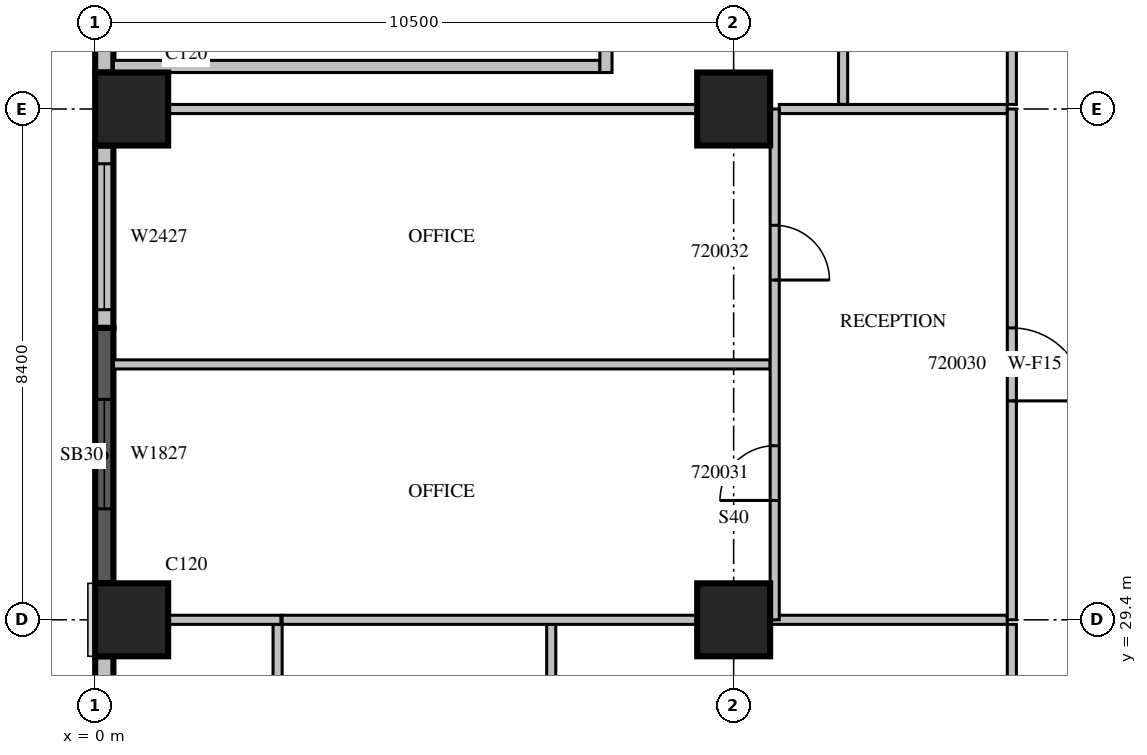
"""IFC4 building model, lengths in metres.
Left out: names, types, materials, properties, quantities, classifications, styles, units other than length and angle.
Written with IfcOpenShell. Run it as: python <this file> out.ifc"""

import sys

from ifc_helpers import new_model, si_unit, direction, frame, frame_2d, origin, origin_2d, place, context, subcontext, project, spatial, rectangle, extrude, source, transform, mapped, element, fill, save


model = new_model("IFC4")
c1 = context("Model", 3, precision=1e-05, world=origin(), true_north=direction((0.0, 1.0)))
c2 = subcontext(c1, "Body", "Model", "MODEL_VIEW")
j1 = project(units=[si_unit("LENGTHUNIT", "METRE"), si_unit("PLANEANGLEUNIT", "RADIAN")], contexts=[c1])
p1 = place(None, origin())
s1 = spatial("IfcSite", under=j1, at=p1, CompositionType="ELEMENT")
p2 = place(p1, origin())
s2 = spatial("IfcBuilding", under=s1, at=p2, CompositionType="ELEMENT")
p3 = place(p2, frame((0.0, 0.0, 95.1)))
s3 = spatial("IfcBuildingStorey", under=s2, at=p3, CompositionType="ELEMENT", Elevation=95.1)
m1 = source(origin(), c2, "Body", "SweptSolid", [
    extrude(rectangle(XDim=1.2, YDim=1.2, at=origin_2d()), origin(), (0.0, 0.0, 1.0), 4.2),
])
for number, where, z_axis, x_axis in (
    (1, (0.6, 29.4, 0.0), (0.0, 0.0, 1.0), (1.0, 0.0, 0.0)),
    (2, (10.5, 29.4, 0.0), (0.0, 0.0, 1.0), (1.0, 0.0, 0.0)),
    (3, (0.6, 37.8, 0.0), (0.0, 0.0, 1.0), (1.0, 0.0, 0.0)),
    (4, (10.5, 37.8, 0.0), (0.0, 0.0, 1.0), (1.0, 0.0, 0.0)),
):
    element("IfcColumn", number, at=place(p3, frame(where, z_axis=z_axis, x_axis=x_axis)), inside=s3, PredefinedType="COLUMN", context=c2, shape_type="MappedRepresentation", body=[
        mapped(m1, transform((0.0, 0.0, 0.0), scale=1.0)),
    ])
m2 = source(origin(), c2, "Body", "SweptSolid", [
    extrude(rectangle(XDim=1.8, YDim=0.3, at=frame_2d((0.9, 0.0))), origin(), (0.0, 0.0, 1.0), 3.8),
])
p4 = place(p3, frame((0.15, 40.2, 0.0), z_axis=(0.0, 0.0, 1.0), x_axis=(0.0, -1.0, 0.0)))
e5 = element("IfcWall", 5, at=p4, inside=s3, PredefinedType="STANDARD", context=c2, shape_type="MappedRepresentation", body=[
    mapped(m2, transform((0.0, 0.0, 0.0), scale=1.0)),
])
m3 = source(origin(), c2, "Body", "SweptSolid", [
    extrude(rectangle(XDim=3.0, YDim=0.3, at=frame_2d((1.5, 0.0))), origin(), (0.0, 0.0, 1.0), 3.8),
])
p5 = place(p3, frame((0.15, 37.2, 0.0), z_axis=(0.0, 0.0, 1.0), x_axis=(0.0, -1.0, 0.0)))
e6 = element("IfcWall", 6, at=p5, inside=s3, PredefinedType="STANDARD", context=c2, shape_type="MappedRepresentation", body=[
    mapped(m3, transform((0.0, 0.0, 0.0), scale=1.0)),
])
m4 = source(origin(), c2, "Body", "SweptSolid", [
    extrude(rectangle(XDim=2.4, YDim=2.7, at=frame_2d((1.2, 1.35))), frame((0.0, 0.16, 0.0), z_axis=(0.0, -1.0, 0.0), x_axis=(1.0, 0.0, 0.0)), (0.0, 0.0, 1.0), 0.32),
])
p6 = place(p5, frame((0.3, 0.0, 0.6)))
e7 = element("IfcOpeningElement", 7, at=p6, cuts=e6, PredefinedType="OPENING", context=c2, shape_type="MappedRepresentation", body=[
    mapped(m4, transform((0.0, 0.0, 0.0), scale=1.0)),
])
m5 = source(origin(), c2, "Body", "SweptSolid", [
    extrude(rectangle(XDim=4.2, YDim=0.3, at=frame_2d((2.1, 0.0))), origin(), (0.0, 0.0, 1.0), 3.8),
])
p7 = place(p3, frame((0.15, 34.2, 0.0), z_axis=(0.0, 0.0, 1.0), x_axis=(0.0, -1.0, 0.0)))
e8 = element("IfcWall", 8, at=p7, inside=s3, PredefinedType="SOLIDWALL", context=c2, shape_type="MappedRepresentation", body=[
    mapped(m5, transform((0.0, 0.0, 0.0), scale=1.0)),
])
m6 = source(origin(), c2, "Body", "SweptSolid", [
    extrude(rectangle(XDim=1.8, YDim=2.7, at=frame_2d((0.9, 1.35))), frame((0.0, 0.16, 0.0), z_axis=(0.0, -1.0, 0.0), x_axis=(1.0, 0.0, 0.0)), (0.0, 0.0, 1.0), 0.32),
])
p8 = place(p7, frame((1.175, 0.0, 0.6)))
e9 = element("IfcOpeningElement", 9, at=p8, cuts=e8, PredefinedType="OPENING", context=c2, shape_type="MappedRepresentation", body=[
    mapped(m6, transform((0.0, 0.0, 0.0), scale=1.0)),
])
m7 = source(origin(), c2, "Body", "SweptSolid", [
    extrude(rectangle(XDim=7.2, YDim=0.3, at=frame_2d((3.6, 0.0))), origin(), (0.0, 0.0, 1.0), 3.8),
])
p9 = place(p3, frame((0.15, 28.8, 0.0), z_axis=(0.0, 0.0, 1.0), x_axis=(0.0, -1.0, 0.0)))
e10 = element("IfcWall", 10, at=p9, inside=s3, PredefinedType="STANDARD", context=c2, shape_type="MappedRepresentation", body=[
    mapped(m7, transform((0.0, 0.0, 0.0), scale=1.0)),
])
m8 = source(origin(), c2, "Body", "SweptSolid", [
    extrude(rectangle(XDim=3.0, YDim=2.7, at=frame_2d((1.5, 1.35))), frame((0.0, 0.16, 0.0), z_axis=(0.0, -1.0, 0.0), x_axis=(1.0, 0.0, 0.0)), (0.0, 0.0, 1.0), 0.32),
])
p10 = place(p9, frame((0.84, 0.0, 0.6)))
e11 = element("IfcOpeningElement", 11, at=p10, cuts=e10, PredefinedType="OPENING", context=c2, shape_type="MappedRepresentation", body=[
    mapped(m8, transform((0.0, 0.0, 0.0), scale=1.0)),
])
p11 = place(p9, frame((4.32, 0.0, 0.6)))
e12 = element("IfcOpeningElement", 12, at=p11, cuts=e10, PredefinedType="OPENING", context=c2, shape_type="MappedRepresentation", body=[
    mapped(m4, transform((0.0, 0.0, 0.0), scale=1.0)),
])
m9 = source(origin(), c2, "Body", "SweptSolid", [
    extrude(rectangle(XDim=8.0, YDim=0.2, at=frame_2d((4.0, 0.0))), origin(), (0.0, 0.0, 1.0), 3.8),
])
p12 = place(p3, frame((0.3, 38.5, 0.0), z_axis=(0.0, 0.0, 1.0), x_axis=(1.0, 0.0, 0.0)))
e13 = element("IfcWall", 13, at=p12, inside=s3, PredefinedType="PARTITIONING", context=c2, shape_type="MappedRepresentation", body=[
    mapped(m9, transform((0.0, 0.0, 0.0), scale=1.0)),
])
m10 = source(origin(), c2, "Body", "SweptSolid", [
    extrude(rectangle(XDim=5.45, YDim=0.2, at=frame_2d((2.725, 0.0))), origin(), (0.0, 0.0, 1.0), 3.8),
])
p13 = place(p3, frame((8.4, 38.4, 0.0), z_axis=(0.0, 0.0, 1.0), x_axis=(0.0, 1.0, 0.0)))
e14 = element("IfcWall", 14, at=p13, inside=s3, PredefinedType="PARTITIONING", context=c2, shape_type="MappedRepresentation", body=[
    mapped(m10, transform((0.0, 0.0, 0.0), scale=1.0)),
])
m11 = source(origin(), c2, "Body", "SweptSolid", [
    extrude(rectangle(XDim=1.2, YDim=2.1, at=frame_2d((0.6, 1.05))), frame((0.0, 0.11, 0.0), z_axis=(0.0, -1.0, 0.0), x_axis=(1.0, 0.0, 0.0)), (0.0, 0.0, 1.0), 0.22),
])
p14 = place(p13, frame((0.4, 0.0, 0.0)))
e15 = element("IfcOpeningElement", 15, at=p14, cuts=e14, PredefinedType="OPENING", context=c2, shape_type="MappedRepresentation", body=[
    mapped(m11, transform((0.0, 0.0, 0.0), scale=1.0)),
])
m12 = source(origin(), c2, "Body", "SweptSolid", [
    extrude(rectangle(XDim=0.9, YDim=2.1, at=frame_2d((0.45, 1.05))), frame((0.0, 0.11, 0.0), z_axis=(0.0, -1.0, 0.0), x_axis=(1.0, 0.0, 0.0)), (0.0, 0.0, 1.0), 0.22),
])
p15 = place(p13, frame((3.25, 0.0, 0.0)))
e16 = element("IfcOpeningElement", 16, at=p15, cuts=e14, PredefinedType="OPENING", context=c2, shape_type="MappedRepresentation", body=[
    mapped(m12, transform((0.0, 0.0, 0.0), scale=1.0)),
])
m13 = source(origin(), c2, "Body", "SweptSolid", [
    extrude(rectangle(XDim=3.65, YDim=0.15, at=frame_2d((1.825, 0.0))), origin(), (0.0, 0.0, 1.0), 3.8),
])
for number, where, z_axis, x_axis in (
    (17, (7.5, 25.675, 0.0), (0.0, 0.0, 1.0), (0.0, 1.0, 0.0)),
    (18, (15.075, 25.675, 0.0), (0.0, 0.0, 1.0), (0.0, 1.0, 0.0)),
):
    element("IfcWall", number, at=place(p3, frame(where, z_axis=z_axis, x_axis=x_axis)), inside=s3, PredefinedType="PARTITIONING", context=c2, shape_type="MappedRepresentation", body=[
        mapped(m13, transform((0.0, 0.0, 0.0), scale=1.0)),
    ])
m14 = source(origin(), c2, "Body", "SweptSolid", [
    extrude(rectangle(XDim=6.826, YDim=0.15, at=frame_2d((3.413, 0.0))), origin(), (0.0, 0.0, 1.0), 3.8),
])
p16 = place(p3, frame((9.901, 29.4, 0.0), z_axis=(0.0, 0.0, 1.0), x_axis=(-1.0, 0.0, 0.0)))
e19 = element("IfcWall", 19, at=p16, inside=s3, PredefinedType="PARTITIONING", context=c2, shape_type="MappedRepresentation", body=[
    mapped(m14, transform((0.0, 0.0, 0.0), scale=1.0)),
])
m15 = source(origin(), c2, "Body", "SweptSolid", [
    extrude(rectangle(XDim=3.901, YDim=0.15, at=frame_2d((1.95, 0.0))), origin(), (0.0, 0.0, 1.0), 3.8),
])
p17 = place(p3, frame((15.0, 29.4, 0.0), z_axis=(0.0, 0.0, 1.0), x_axis=(-1.0, 0.0, 0.0)))
e20 = element("IfcWall", 20, at=p17, inside=s3, PredefinedType="PARTITIONING", context=c2, shape_type="MappedRepresentation", body=[
    mapped(m15, transform((0.0, 0.0, 0.0), scale=1.0)),
])
m16 = source(origin(), c2, "Body", "SweptSolid", [
    extrude(rectangle(XDim=7.125, YDim=0.15, at=frame_2d((3.562, 0.0))), origin(), (0.0, 0.0, 1.0), 3.8),
])
p18 = place(p3, frame((3.0, 29.325, 0.0), z_axis=(0.0, 0.0, 1.0), x_axis=(0.0, -1.0, 0.0)))
e21 = element("IfcWall", 21, at=p18, inside=s3, PredefinedType="PARTITIONING", context=c2, shape_type="MappedRepresentation", body=[
    mapped(m16, transform((0.0, 0.0, 0.0), scale=1.0)),
])
m17 = source(origin(), c2, "Body", "SweptSolid", [
    extrude(rectangle(XDim=2.2, YDim=2.1, at=frame_2d((1.1, 1.05))), frame((0.0, 0.085, 0.0), z_axis=(0.0, -1.0, 0.0), x_axis=(1.0, 0.0, 0.0)), (0.0, 0.0, 1.0), 0.17),
])
p19 = place(p18, frame((4.325, 0.0, 0.0)))
e22 = element("IfcOpeningElement", 22, at=p19, cuts=e21, PredefinedType="OPENING", context=c2, shape_type="MappedRepresentation", body=[
    mapped(m17, transform((0.0, 0.0, 0.0), scale=1.0)),
])
m18 = source(origin(), c2, "Body", "SweptSolid", [
    extrude(rectangle(XDim=6.45, YDim=0.15, at=frame_2d((3.225, 0.0))), origin(), (0.0, 0.0, 1.0), 3.8),
])
p20 = place(p3, frame((12.3, 44.325, 0.0), z_axis=(0.0, 0.0, 1.0), x_axis=(0.0, -1.0, 0.0)))
e23 = element("IfcWall", 23, at=p20, inside=s3, PredefinedType="PARTITIONING", context=c2, shape_type="MappedRepresentation", body=[
    mapped(m18, transform((0.0, 0.0, 0.0), scale=1.0)),
])
p21 = place(p3, frame((15.075, 37.875, 0.0), z_axis=(0.0, 0.0, 1.0), x_axis=(0.0, 1.0, 0.0)))
e24 = element("IfcWall", 24, at=p21, inside=s3, PredefinedType="PARTITIONING", context=c2, shape_type="MappedRepresentation", body=[
    mapped(m18, transform((0.0, 0.0, 0.0), scale=1.0)),
])
m19 = source(origin(), c2, "Body", "SweptSolid", [
    extrude(rectangle(XDim=0.9, YDim=2.1, at=frame_2d((0.45, 1.05))), frame((0.0, 0.085, 0.0), z_axis=(0.0, -1.0, 0.0), x_axis=(1.0, 0.0, 0.0)), (0.0, 0.0, 1.0), 0.17),
])
p22 = place(p21, frame((2.737, 0.0, 0.0)))
e25 = element("IfcOpeningElement", 25, at=p22, cuts=e24, PredefinedType="OPENING", context=c2, shape_type="MappedRepresentation", body=[
    mapped(m19, transform((0.0, 0.0, 0.0), scale=1.0)),
])
m20 = source(origin(), c2, "Body", "SweptSolid", [
    extrude(rectangle(XDim=10.8, YDim=0.15, at=frame_2d((5.4, 0.0))), origin(), (0.0, 0.0, 1.0), 3.8),
])
p23 = place(p3, frame((11.1, 33.6, 0.0), z_axis=(0.0, 0.0, 1.0), x_axis=(-1.0, 0.0, 0.0)))
e26 = element("IfcWall", 26, at=p23, inside=s3, PredefinedType="PARTITIONING", context=c2, shape_type="MappedRepresentation", body=[
    mapped(m20, transform((0.0, 0.0, 0.0), scale=1.0)),
])
m21 = source(origin(), c2, "Body", "SweptSolid", [
    extrude(rectangle(XDim=1.856, YDim=0.15, at=frame_2d((0.928, 0.0))), origin(), (0.0, 0.0, 1.0), 3.8),
])
p24 = place(p3, frame((3.055, 29.4, 0.0), z_axis=(0.0, 0.0, 1.0), x_axis=(-1.0, 0.0, 0.0)))
e27 = element("IfcWall", 27, at=p24, inside=s3, PredefinedType="PARTITIONING", context=c2, shape_type="MappedRepresentation", body=[
    mapped(m21, transform((0.0, 0.0, 0.0), scale=1.0)),
])
m22 = source(origin(), c2, "Body", "SweptSolid", [
    extrude(rectangle(XDim=8.702, YDim=0.15, at=frame_2d((4.351, 0.0))), origin(), (0.0, 0.0, 1.0), 3.8),
])
p25 = place(p3, frame((9.901, 37.8, 0.0), z_axis=(0.0, 0.0, 1.0), x_axis=(-1.0, 0.0, 0.0)))
e28 = element("IfcWall", 28, at=p25, inside=s3, PredefinedType="PARTITIONING", context=c2, shape_type="MappedRepresentation", body=[
    mapped(m22, transform((0.0, 0.0, 0.0), scale=1.0)),
])
m23 = source(origin(), c2, "Body", "SweptSolid", [
    extrude(rectangle(XDim=3.75, YDim=0.15, at=frame_2d((1.875, 0.0))), origin(), (0.0, 0.0, 1.0), 3.8),
])
p26 = place(p3, frame((15.0, 37.8, 0.0), z_axis=(0.0, 0.0, 1.0), x_axis=(-1.0, 0.0, 0.0)))
e29 = element("IfcWall", 29, at=p26, inside=s3, PredefinedType="PARTITIONING", context=c2, shape_type="MappedRepresentation", body=[
    mapped(m23, transform((0.0, 0.0, 0.0), scale=1.0)),
])
m24 = source(origin(), c2, "Body", "SweptSolid", [
    extrude(rectangle(XDim=8.4, YDim=0.15, at=frame_2d((4.2, 0.0))), origin(), (0.0, 0.0, 1.0), 3.8),
])
p27 = place(p3, frame((11.175, 29.4, 0.0), z_axis=(0.0, 0.0, 1.0), x_axis=(0.0, 1.0, 0.0)))
e30 = element("IfcWall", 30, at=p27, inside=s3, PredefinedType="PARTITIONING", context=c2, shape_type="MappedRepresentation", body=[
    mapped(m24, transform((0.0, 0.0, 0.0), scale=1.0)),
])
p28 = place(p27, frame((1.962, 0.0, 0.0)))
e31 = element("IfcOpeningElement", 31, at=p28, cuts=e30, PredefinedType="OPENING", context=c2, shape_type="MappedRepresentation", body=[
    mapped(m19, transform((0.0, 0.0, 0.0), scale=1.0)),
])
p29 = place(p27, frame((5.588, 0.0, 0.0)))
e32 = element("IfcOpeningElement", 32, at=p29, cuts=e30, PredefinedType="OPENING", context=c2, shape_type="MappedRepresentation", body=[
    mapped(m19, transform((0.0, 0.0, 0.0), scale=1.0)),
])
p30 = place(p3, frame((15.075, 29.4, 0.0), z_axis=(0.0, 0.0, 1.0), x_axis=(0.0, 1.0, 0.0)))
e33 = element("IfcWall", 33, at=p30, inside=s3, PredefinedType="PARTITIONING", context=c2, shape_type="MappedRepresentation", body=[
    mapped(m24, transform((0.0, 0.0, 0.0), scale=1.0)),
])
m25 = source(origin(), c2, "Body", "SweptSolid", [
    extrude(rectangle(XDim=1.2, YDim=2.1, at=frame_2d((0.6, 1.05))), frame((0.0, 0.085, 0.0), z_axis=(0.0, -1.0, 0.0), x_axis=(1.0, 0.0, 0.0)), (0.0, 0.0, 1.0), 0.17),
])
p31 = place(p30, frame((3.6, 0.0, 0.0)))
e34 = element("IfcOpeningElement", 34, at=p31, cuts=e33, PredefinedType="OPENING", context=c2, shape_type="MappedRepresentation", body=[
    mapped(m25, transform((0.0, 0.0, 0.0), scale=1.0)),
])
m26 = source(origin(), c2, "Body", "SweptSolid", [
    extrude(rectangle(XDim=2.4, YDim=2.7, at=frame_2d((1.2, 1.35))), frame((0.0, 0.03, 0.0), z_axis=(0.0, -1.0, 0.0), x_axis=(1.0, 0.0, 0.0)), (0.0, 0.0, 1.0), 0.06),
])
p32 = place(p6, origin())
e35 = element("IfcWindow", 35, at=p32, inside=s3, PartitioningType="SINGLE_PANEL", PredefinedType="WINDOW", context=c2, shape_type="MappedRepresentation", body=[
    mapped(m26, transform((0.0, 0.0, 0.0), scale=1.0)),
])
fill(e7, e35)
m27 = source(origin(), c2, "Body", "SweptSolid", [
    extrude(rectangle(XDim=1.8, YDim=2.7, at=frame_2d((0.9, 1.35))), frame((0.0, 0.03, 0.0), z_axis=(0.0, -1.0, 0.0), x_axis=(1.0, 0.0, 0.0)), (0.0, 0.0, 1.0), 0.06),
])
p33 = place(p8, origin())
e36 = element("IfcWindow", 36, at=p33, inside=s3, PartitioningType="SINGLE_PANEL", PredefinedType="WINDOW", context=c2, shape_type="MappedRepresentation", body=[
    mapped(m27, transform((0.0, 0.0, 0.0), scale=1.0)),
])
fill(e9, e36)
m28 = source(origin(), c2, "Body", "SweptSolid", [
    extrude(rectangle(XDim=1.2, YDim=2.1, at=frame_2d((0.6, 1.05))), frame((0.0, 0.025, 0.0), z_axis=(0.0, -1.0, 0.0), x_axis=(1.0, 0.0, 0.0)), (0.0, 0.0, 1.0), 0.05),
])
p34 = place(p31, origin())
e37 = element("IfcDoor", 37, at=p34, inside=s3, OperationType="SINGLE_SWING_RIGHT", PredefinedType="DOOR", context=c2, shape_type="MappedRepresentation", body=[
    mapped(m28, transform((0.0, 0.0, 0.0), scale=1.0)),
])
fill(e34, e37)
m29 = source(origin(), c2, "Body", "SweptSolid", [
    extrude(rectangle(XDim=0.9, YDim=2.1, at=frame_2d((0.45, 1.05))), frame((0.0, 0.025, 0.0), z_axis=(0.0, -1.0, 0.0), x_axis=(1.0, 0.0, 0.0)), (0.0, 0.0, 1.0), 0.05),
])
p35 = place(p28, origin())
e38 = element("IfcDoor", 38, at=p35, inside=s3, OperationType="SINGLE_SWING_LEFT", PredefinedType="DOOR", context=c2, shape_type="MappedRepresentation", body=[
    mapped(m29, transform((0.0, 0.0, 0.0), scale=1.0)),
])
fill(e31, e38)
p36 = place(p29, origin())
e39 = element("IfcDoor", 39, at=p36, inside=s3, OperationType="SINGLE_SWING_RIGHT", PredefinedType="DOOR", context=c2, shape_type="MappedRepresentation", body=[
    mapped(m29, transform((0.0, 0.0, 0.0), scale=1.0)),
])
fill(e32, e39)
save(model, sys.argv[1])
